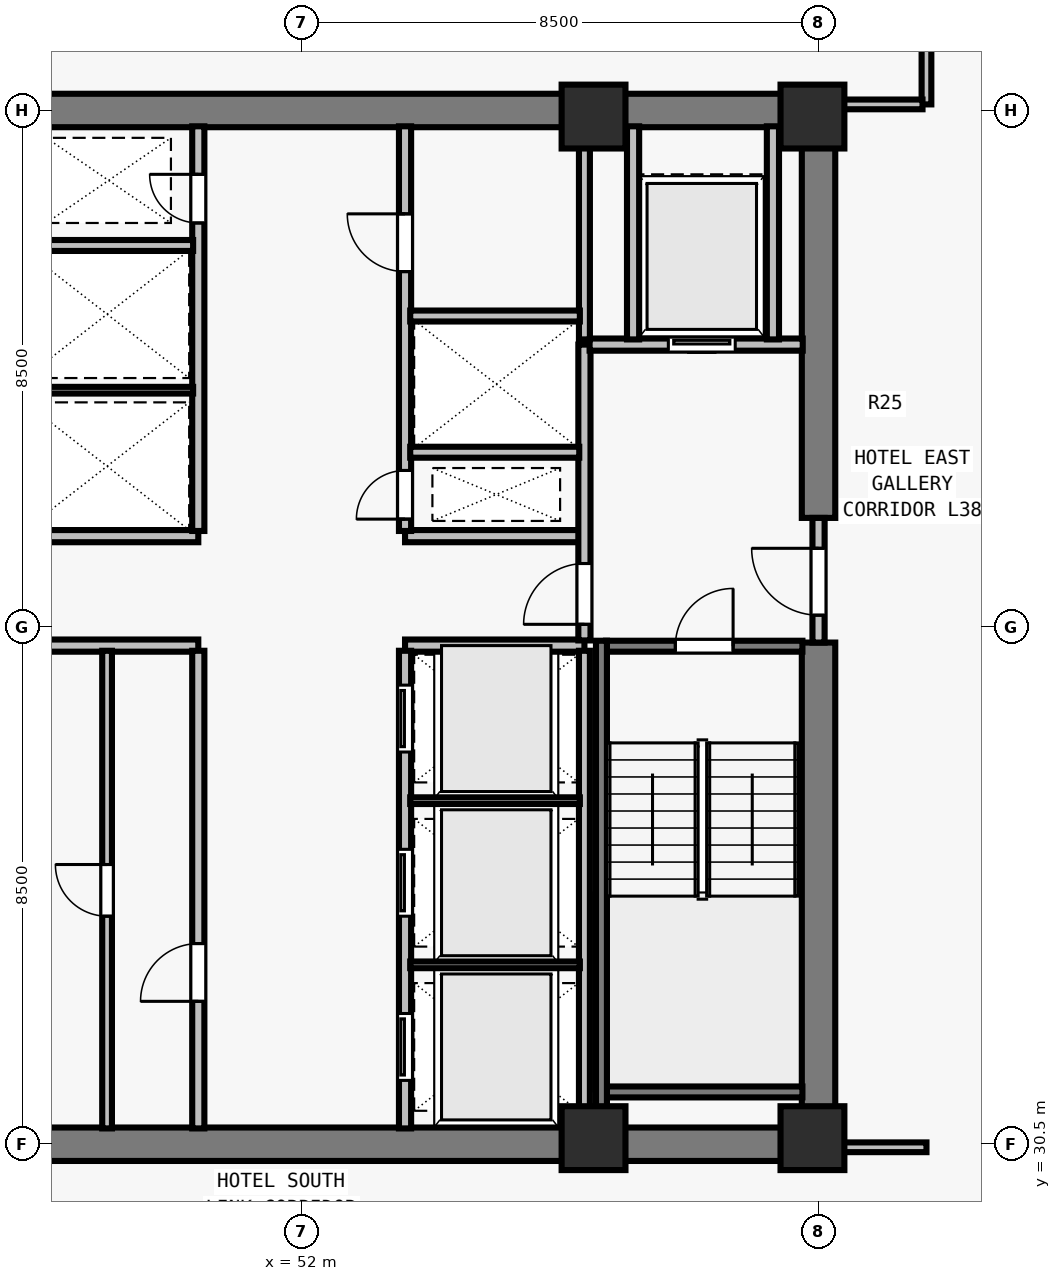
"""IFC4 building model, lengths in metres.
Left out: names, types, materials, properties, quantities, classifications, styles, units other than length and angle.
Written with IfcOpenShell. Run it as: python <this file> out.ifc"""

import sys

from ifc_helpers import new_model, si_unit, direction, frame, frame_2d, origin, origin_2d, place, context, subcontext, project, spatial, rectangle, extrude, element, fill, save


model = new_model("IFC4")
c1 = context("Model", 3, precision=1e-05, world=origin(), true_north=direction((0.0, 1.0)))
c2 = subcontext(c1, "Body", "Model", "MODEL_VIEW")
j1 = project(units=[si_unit("LENGTHUNIT", "METRE"), si_unit("PLANEANGLEUNIT", "RADIAN")], contexts=[c1])
p1 = place(None, origin())
s1 = spatial("IfcSite", under=j1, at=p1, CompositionType="ELEMENT")
p2 = place(p1, origin())
s2 = spatial("IfcBuilding", under=s1, at=p2, CompositionType="ELEMENT")
p3 = place(p2, frame((0.0, 0.0, 141.0)))
s3 = spatial("IfcBuildingStorey", under=s2, at=p3, CompositionType="ELEMENT", Elevation=141.0)
for number, where, z_axis, x_axis in (
    (1, (56.8, 30.6, 0.0), (0.0, 0.0, 1.0), (1.0, 0.0, 0.0)),
    (2, (60.4, 30.6, 0.0), (0.0, 0.0, 1.0), (1.0, 0.0, 0.0)),
    (3, (56.8, 47.4, 0.0), (0.0, 0.0, 1.0), (1.0, 0.0, 0.0)),
    (4, (60.4, 47.4, 0.0), (0.0, 0.0, 1.0), (1.0, 0.0, 0.0)),
):
    element("IfcColumn", number, at=place(p3, frame(where, z_axis=z_axis, x_axis=x_axis)), inside=s3, PredefinedType="COLUMN", context=c2, shape_type="SweptSolid", body=[
        extrude(rectangle(XDim=1.05, YDim=1.05, at=origin_2d()), origin(), (0.0, 0.0, 1.0), 3.5),
    ])
for number, where, z_axis, x_axis in (
    (5, (43.225, 30.5, 0.0), (0.0, 0.0, 1.0), (1.0, 0.0, 0.0)),
    (6, (43.225, 47.5, 0.0), (0.0, 0.0, 1.0), (1.0, 0.0, 0.0)),
):
    element("IfcWall", number, at=place(p3, frame(where, z_axis=z_axis, x_axis=x_axis)), inside=s3, PredefinedType="SHEAR", context=c2, shape_type="SweptSolid", body=[
        extrude(rectangle(XDim=17.55, YDim=0.55, at=frame_2d((8.775, 0.0))), origin(), (0.0, 0.0, 1.0), 3.28),
    ])
p4 = place(p3, frame((60.5, 30.765, 0.0), z_axis=(0.0, 0.0, 1.0), x_axis=(0.0, 1.0, 0.0)))
e7 = element("IfcWall", 7, at=p4, inside=s3, PredefinedType="SHEAR", context=c2, shape_type="SweptSolid", body=[
    extrude(rectangle(XDim=7.985, YDim=0.55, at=frame_2d((3.993, 0.0))), origin(), (0.0, 0.0, 1.0), 3.28),
])
p5 = place(p3, frame((60.5, 40.8, 0.0), z_axis=(0.0, 0.0, 1.0), x_axis=(0.0, 1.0, 0.0)))
e8 = element("IfcWall", 8, at=p5, inside=s3, PredefinedType="SHEAR", context=c2, shape_type="SweptSolid", body=[
    extrude(rectangle(XDim=6.435, YDim=0.55, at=frame_2d((3.218, 0.0))), origin(), (0.0, 0.0, 1.0), 3.28),
])
for number, where, z_axis, x_axis in (
    (9, (47.35, 38.7, 0.0), (0.0, 0.0, 1.0), (1.0, 0.0, 0.0)),
    (10, (47.35, 40.5, 0.0), (0.0, 0.0, 1.0), (1.0, 0.0, 0.0)),
    (11, (53.7, 38.7, 0.0), (0.0, 0.0, 1.0), (1.0, 0.0, 0.0)),
    (12, (53.7, 40.5, 0.0), (0.0, 0.0, 1.0), (1.0, 0.0, 0.0)),
):
    element("IfcWall", number, at=place(p3, frame(where, z_axis=z_axis, x_axis=x_axis)), inside=s3, PredefinedType="SOLIDWALL", context=c2, shape_type="SweptSolid", body=[
        extrude(rectangle(XDim=2.95, YDim=0.2, at=frame_2d((1.475, 0.0))), origin(), (0.0, 0.0, 1.0), 3.28),
    ])
p6 = place(p3, frame((50.3, 30.76, 0.0), z_axis=(0.0, 0.0, 1.0), x_axis=(0.0, 1.0, 0.0)))
e13 = element("IfcWall", 13, at=p6, inside=s3, PredefinedType="SOLIDWALL", context=c2, shape_type="SweptSolid", body=[
    extrude(rectangle(XDim=7.855, YDim=0.2, at=frame_2d((3.927, 0.0))), origin(), (0.0, 0.0, 1.0), 3.28),
])
p7 = place(p6, frame((2.09, 0.0, 0.0)))
e14 = element("IfcOpeningElement", 14, at=p7, cuts=e13, PredefinedType="OPENING", context=c2, shape_type="SweptSolid", body=[
    extrude(rectangle(XDim=0.95, YDim=2.12, at=frame_2d((0.475, 1.06))), frame((0.0, 0.11, 0.0), z_axis=(0.0, -1.0, 0.0), x_axis=(1.0, 0.0, 0.0)), (0.0, 0.0, 1.0), 0.22),
])
p8 = place(p3, frame((53.7, 30.76, 0.0), z_axis=(0.0, 0.0, 1.0), x_axis=(0.0, 1.0, 0.0)))
e15 = element("IfcWall", 15, at=p8, inside=s3, PredefinedType="SOLIDWALL", context=c2, shape_type="SweptSolid", body=[
    extrude(rectangle(XDim=7.855, YDim=0.2, at=frame_2d((3.927, 0.0))), origin(), (0.0, 0.0, 1.0), 3.28),
])
p9 = place(p8, frame((0.79, 0.0, 0.0)))
e16 = element("IfcOpeningElement", 16, at=p9, cuts=e15, PredefinedType="OPENING", context=c2, shape_type="SweptSolid", body=[
    extrude(rectangle(XDim=1.1, YDim=2.2, at=frame_2d((0.55, 1.1))), frame((0.0, 0.11, 0.0), z_axis=(0.0, -1.0, 0.0), x_axis=(1.0, 0.0, 0.0)), (0.0, 0.0, 1.0), 0.22),
])
p10 = place(p8, frame((3.49, 0.0, 0.0)))
e17 = element("IfcOpeningElement", 17, at=p10, cuts=e15, PredefinedType="OPENING", context=c2, shape_type="SweptSolid", body=[
    extrude(rectangle(XDim=1.1, YDim=2.2, at=frame_2d((0.55, 1.1))), frame((0.0, 0.11, 0.0), z_axis=(0.0, -1.0, 0.0), x_axis=(1.0, 0.0, 0.0)), (0.0, 0.0, 1.0), 0.22),
])
p11 = place(p8, frame((6.19, 0.0, 0.0)))
e18 = element("IfcOpeningElement", 18, at=p11, cuts=e15, PredefinedType="OPENING", context=c2, shape_type="SweptSolid", body=[
    extrude(rectangle(XDim=1.1, YDim=2.2, at=frame_2d((0.55, 1.1))), frame((0.0, 0.11, 0.0), z_axis=(0.0, -1.0, 0.0), x_axis=(1.0, 0.0, 0.0)), (0.0, 0.0, 1.0), 0.22),
])
p12 = place(p3, frame((50.3, 40.585, 0.0), z_axis=(0.0, 0.0, 1.0), x_axis=(0.0, 1.0, 0.0)))
e19 = element("IfcWall", 19, at=p12, inside=s3, PredefinedType="SOLIDWALL", context=c2, shape_type="SweptSolid", body=[
    extrude(rectangle(XDim=6.655, YDim=0.2, at=frame_2d((3.328, 0.0))), origin(), (0.0, 0.0, 1.0), 3.28),
])
p13 = place(p12, frame((5.065, 0.0, 0.0)))
e20 = element("IfcOpeningElement", 20, at=p13, cuts=e19, PredefinedType="OPENING", context=c2, shape_type="SweptSolid", body=[
    extrude(rectangle(XDim=0.8, YDim=2.08, at=frame_2d((0.4, 1.04))), frame((0.0, 0.11, 0.0), z_axis=(0.0, -1.0, 0.0), x_axis=(1.0, 0.0, 0.0)), (0.0, 0.0, 1.0), 0.22),
])
p14 = place(p3, frame((53.7, 40.585, 0.0), z_axis=(0.0, 0.0, 1.0), x_axis=(0.0, 1.0, 0.0)))
e21 = element("IfcWall", 21, at=p14, inside=s3, PredefinedType="SOLIDWALL", context=c2, shape_type="SweptSolid", body=[
    extrude(rectangle(XDim=6.655, YDim=0.2, at=frame_2d((3.328, 0.0))), origin(), (0.0, 0.0, 1.0), 3.28),
])
p15 = place(p14, frame((0.195, 0.0, 0.0)))
e22 = element("IfcOpeningElement", 22, at=p15, cuts=e21, PredefinedType="OPENING", context=c2, shape_type="SweptSolid", body=[
    extrude(rectangle(XDim=0.8, YDim=2.08, at=frame_2d((0.4, 1.04))), frame((0.0, 0.11, 0.0), z_axis=(0.0, -1.0, 0.0), x_axis=(1.0, 0.0, 0.0)), (0.0, 0.0, 1.0), 0.22),
])
p16 = place(p14, frame((4.265, 0.0, 0.0)))
e23 = element("IfcOpeningElement", 23, at=p16, cuts=e21, PredefinedType="OPENING", context=c2, shape_type="SweptSolid", body=[
    extrude(rectangle(XDim=0.95, YDim=2.12, at=frame_2d((0.475, 1.06))), frame((0.0, 0.11, 0.0), z_axis=(0.0, -1.0, 0.0), x_axis=(1.0, 0.0, 0.0)), (0.0, 0.0, 1.0), 0.22),
])
p17 = place(p3, frame((60.5, 38.75, 0.0), z_axis=(0.0, 0.0, 1.0), x_axis=(0.0, 1.0, 0.0)))
e24 = element("IfcWall", 24, at=p17, inside=s3, PredefinedType="SOLIDWALL", context=c2, shape_type="SweptSolid", body=[
    extrude(rectangle(XDim=2.05, YDim=0.2, at=frame_2d((1.025, 0.0))), origin(), (0.0, 0.0, 1.0), 3.28),
])
p18 = place(p17, frame((0.45, 0.0, 0.0)))
e25 = element("IfcOpeningElement", 25, at=p18, cuts=e24, PredefinedType="OPENING", context=c2, shape_type="SweptSolid", body=[
    extrude(rectangle(XDim=1.1, YDim=2.15, at=frame_2d((0.55, 1.075))), frame((0.0, 0.11, 0.0), z_axis=(0.0, -1.0, 0.0), x_axis=(1.0, 0.0, 0.0)), (0.0, 0.0, 1.0), 0.22),
])
p19 = place(p3, frame((56.65, 38.785, 0.0), z_axis=(0.0, 0.0, 1.0), x_axis=(0.0, 1.0, 0.0)))
e26 = element("IfcWall", 26, at=p19, inside=s3, PredefinedType="SOLIDWALL", context=c2, shape_type="SweptSolid", body=[
    extrude(rectangle(XDim=4.865, YDim=0.2, at=frame_2d((2.433, 0.0))), origin(), (0.0, 0.0, 1.0), 3.28),
])
p20 = place(p19, frame((0.265, 0.0, 0.0)))
e27 = element("IfcOpeningElement", 27, at=p20, cuts=e26, PredefinedType="OPENING", context=c2, shape_type="SweptSolid", body=[
    extrude(rectangle(XDim=1.0, YDim=2.15, at=frame_2d((0.5, 1.075))), frame((0.0, 0.11, 0.0), z_axis=(0.0, -1.0, 0.0), x_axis=(1.0, 0.0, 0.0)), (0.0, 0.0, 1.0), 0.22),
])
p21 = place(p3, frame((56.735, 43.65, 0.0), z_axis=(0.0, 0.0, 1.0), x_axis=(1.0, 0.0, 0.0)))
e28 = element("IfcWall", 28, at=p21, inside=s3, PredefinedType="SOLIDWALL", context=c2, shape_type="SweptSolid", body=[
    extrude(rectangle(XDim=3.505, YDim=0.2, at=frame_2d((1.752, 0.0))), origin(), (0.0, 0.0, 1.0), 3.28),
])
p22 = place(p21, frame((1.295, 0.0, 0.0)))
e29 = element("IfcOpeningElement", 29, at=p22, cuts=e28, PredefinedType="OPENING", context=c2, shape_type="SweptSolid", body=[
    extrude(rectangle(XDim=1.1, YDim=2.2, at=frame_2d((0.55, 1.1))), frame((0.0, 0.11, 0.0), z_axis=(0.0, -1.0, 0.0), x_axis=(1.0, 0.0, 0.0)), (0.0, 0.0, 1.0), 0.22),
])
for number, where, z_axis, x_axis in (
    (30, (57.45, 43.735, 0.0), (0.0, 0.0, 1.0), (0.0, 1.0, 0.0)),
    (31, (59.75, 43.735, 0.0), (0.0, 0.0, 1.0), (0.0, 1.0, 0.0)),
):
    element("IfcWall", number, at=place(p3, frame(where, z_axis=z_axis, x_axis=x_axis)), inside=s3, PredefinedType="SOLIDWALL", context=c2, shape_type="SweptSolid", body=[
        extrude(rectangle(XDim=3.505, YDim=0.2, at=frame_2d((1.752, 0.0))), origin(), (0.0, 0.0, 1.0), 3.28),
    ])
p23 = place(p3, frame((48.8, 30.76, 0.0), z_axis=(0.0, 0.0, 1.0), x_axis=(0.0, 1.0, 0.0)))
e32 = element("IfcWall", 32, at=p23, inside=s3, PredefinedType="PARTITIONING", context=c2, shape_type="SweptSolid", body=[
    extrude(rectangle(XDim=7.855, YDim=0.16, at=frame_2d((3.927, 0.0))), origin(), (0.0, 0.0, 1.0), 3.28),
])
p24 = place(p23, frame((3.49, 0.0, 0.0)))
e33 = element("IfcOpeningElement", 33, at=p24, cuts=e32, PredefinedType="OPENING", context=c2, shape_type="SweptSolid", body=[
    extrude(rectangle(XDim=0.85, YDim=2.12, at=frame_2d((0.425, 1.06))), frame((0.0, 0.09, 0.0), z_axis=(0.0, -1.0, 0.0), x_axis=(1.0, 0.0, 0.0)), (0.0, 0.0, 1.0), 0.18),
])
p25 = place(p3, frame((56.65, 30.76, 0.0), z_axis=(0.0, 0.0, 1.0), x_axis=(0.0, 1.0, 0.0)))
e34 = element("IfcWall", 34, at=p25, inside=s3, PredefinedType="SOLIDWALL", context=c2, shape_type="SweptSolid", body=[
    extrude(rectangle(XDim=7.855, YDim=0.18, at=frame_2d((3.927, 0.0))), origin(), (0.0, 0.0, 1.0), 3.28),
])
for number, where, z_axis, x_axis in (
    (35, (53.785, 33.45, 0.0), (0.0, 0.0, 1.0), (1.0, 0.0, 0.0)),
    (36, (53.785, 36.15, 0.0), (0.0, 0.0, 1.0), (1.0, 0.0, 0.0)),
):
    element("IfcWall", number, at=place(p3, frame(where, z_axis=z_axis, x_axis=x_axis)), inside=s3, PredefinedType="PARTITIONING", context=c2, shape_type="SweptSolid", body=[
        extrude(rectangle(XDim=2.79, YDim=0.11, at=frame_2d((1.395, 0.0))), origin(), (0.0, 0.0, 1.0), 3.28),
    ])
p26 = place(p3, frame((47.435, 42.9, 0.0), z_axis=(0.0, 0.0, 1.0), x_axis=(1.0, 0.0, 0.0)))
e37 = element("IfcWall", 37, at=p26, inside=s3, PredefinedType="PARTITIONING", context=c2, shape_type="SweptSolid", body=[
    extrude(rectangle(XDim=2.78, YDim=0.11, at=frame_2d((1.39, 0.0))), origin(), (0.0, 0.0, 1.0), 3.28),
])
p27 = place(p3, frame((47.425, 45.28, 0.0), z_axis=(0.0, 0.0, 1.0), x_axis=(1.0, 0.0, 0.0)))
e38 = element("IfcWall", 38, at=p27, inside=s3, PredefinedType="SOLIDWALL", context=c2, shape_type="SweptSolid", body=[
    extrude(rectangle(XDim=2.79, YDim=0.18, at=frame_2d((1.395, 0.0))), origin(), (0.0, 0.0, 1.0), 3.28),
])
p28 = place(p3, frame((56.65, 43.735, 0.0), z_axis=(0.0, 0.0, 1.0), x_axis=(0.0, 1.0, 0.0)))
e39 = element("IfcWall", 39, at=p28, inside=s3, PredefinedType="SOLIDWALL", context=c2, shape_type="SweptSolid", body=[
    extrude(rectangle(XDim=3.505, YDim=0.18, at=frame_2d((1.752, 0.0))), origin(), (0.0, 0.0, 1.0), 3.28),
])
p29 = place(p3, frame((53.785, 41.88, 0.0), z_axis=(0.0, 0.0, 1.0), x_axis=(1.0, 0.0, 0.0)))
e40 = element("IfcWall", 40, at=p29, inside=s3, PredefinedType="SOLIDWALL", context=c2, shape_type="SweptSolid", body=[
    extrude(rectangle(XDim=2.78, YDim=0.18, at=frame_2d((1.39, 0.0))), origin(), (0.0, 0.0, 1.0), 3.28),
])
p30 = place(p3, frame((53.785, 44.12, 0.0), z_axis=(0.0, 0.0, 1.0), x_axis=(1.0, 0.0, 0.0)))
e41 = element("IfcWall", 41, at=p30, inside=s3, PredefinedType="SOLIDWALL", context=c2, shape_type="SweptSolid", body=[
    extrude(rectangle(XDim=2.79, YDim=0.18, at=frame_2d((1.395, 0.0))), origin(), (0.0, 0.0, 1.0), 3.28),
])
p31 = place(p3, frame((62.275, 47.6, 0.0), z_axis=(0.0, 0.0, 1.0), x_axis=(0.0, 1.0, 0.0)))
e42 = element("IfcWall", 42, at=p31, inside=s3, PredefinedType="PARTITIONING", context=c2, shape_type="SweptSolid", body=[
    extrude(rectangle(XDim=15.075, YDim=0.16, at=frame_2d((7.538, 0.0))), origin(), (0.0, 0.0, 1.0), 2.555),
])
p32 = place(p3, frame((60.765, 30.45, 0.0), z_axis=(0.0, 0.0, 1.0), x_axis=(1.0, 0.0, 0.0)))
e43 = element("IfcWall", 43, at=p32, inside=s3, PredefinedType="PARTITIONING", context=c2, shape_type="SweptSolid", body=[
    extrude(rectangle(XDim=1.51, YDim=0.16, at=frame_2d((0.755, 0.0))), origin(), (0.0, 0.0, 1.0), 3.28),
])
p33 = place(p3, frame((60.765, 47.6, 0.0), z_axis=(0.0, 0.0, 1.0), x_axis=(1.0, 0.0, 0.0)))
e44 = element("IfcWall", 44, at=p33, inside=s3, PredefinedType="PARTITIONING", context=c2, shape_type="SweptSolid", body=[
    extrude(rectangle(XDim=1.445, YDim=0.16, at=frame_2d((0.723, 0.0))), origin(), (0.0, 0.0, 1.0), 3.28),
])
p34 = place(p3, frame((57.005, 38.69, 0.0), z_axis=(0.0, 0.0, 1.0), x_axis=(1.0, 0.0, 0.0)))
e45 = element("IfcWall", 45, at=p34, inside=s3, PredefinedType="SOLIDWALL", context=c2, shape_type="SweptSolid", body=[
    extrude(rectangle(XDim=3.23, YDim=0.18, at=frame_2d((1.615, 0.0))), origin(), (0.0, 0.0, 1.0), 3.28),
])
p35 = place(p34, frame((1.14, 0.0, 0.0)))
e46 = element("IfcOpeningElement", 46, at=p35, cuts=e45, PredefinedType="OPENING", context=c2, shape_type="SweptSolid", body=[
    extrude(rectangle(XDim=0.95, YDim=2.15, at=frame_2d((0.475, 1.075))), frame((0.0, 0.1, 0.0), z_axis=(0.0, -1.0, 0.0), x_axis=(1.0, 0.0, 0.0)), (0.0, 0.0, 1.0), 0.2),
])
p36 = place(p3, frame((57.005, 31.36, 0.0), z_axis=(0.0, 0.0, 1.0), x_axis=(1.0, 0.0, 0.0)))
e47 = element("IfcWall", 47, at=p36, inside=s3, PredefinedType="SOLIDWALL", context=c2, shape_type="SweptSolid", body=[
    extrude(rectangle(XDim=3.23, YDim=0.18, at=frame_2d((1.615, 0.0))), origin(), (0.0, 0.0, 1.0), 3.28),
])
p37 = place(p3, frame((56.93, 38.78, 0.0), z_axis=(0.0, 0.0, 1.0), x_axis=(0.0, -1.0, 0.0)))
e48 = element("IfcWall", 48, at=p37, inside=s3, PredefinedType="SOLIDWALL", context=c2, shape_type="SweptSolid", body=[
    extrude(rectangle(XDim=8.017, YDim=0.18, at=frame_2d((4.009, 0.0))), origin(), (0.0, 0.0, 1.0), 3.28),
])
p38 = place(p18, origin())
e49 = element("IfcDoor", 49, at=p38, inside=s3, OperationType="SINGLE_SWING_RIGHT", PredefinedType="DOOR", context=c2, shape_type="SweptSolid", body=[
    extrude(rectangle(XDim=1.1, YDim=2.15, at=frame_2d((0.55, 1.075))), frame((0.0, 0.025, 0.0), z_axis=(0.0, -1.0, 0.0), x_axis=(1.0, 0.0, 0.0)), (0.0, 0.0, 1.0), 0.05),
])
fill(e25, e49)
p39 = place(p20, origin())
e50 = element("IfcDoor", 50, at=p39, inside=s3, OperationType="SINGLE_SWING_LEFT", PredefinedType="DOOR", context=c2, shape_type="SweptSolid", body=[
    extrude(rectangle(XDim=1.0, YDim=2.15, at=frame_2d((0.5, 1.075))), frame((0.0, 0.025, 0.0), z_axis=(0.0, -1.0, 0.0), x_axis=(1.0, 0.0, 0.0)), (0.0, 0.0, 1.0), 0.05),
])
fill(e27, e50)
p40 = place(p22, origin())
e51 = element("IfcDoor", 51, at=p40, inside=s3, OperationType="SLIDING_TO_LEFT", PredefinedType="DOOR", context=c2, shape_type="SweptSolid", body=[
    extrude(rectangle(XDim=1.1, YDim=2.2, at=frame_2d((0.55, 1.1))), frame((0.0, 0.025, 0.0), z_axis=(0.0, -1.0, 0.0), x_axis=(1.0, 0.0, 0.0)), (0.0, 0.0, 1.0), 0.05),
])
fill(e29, e51)
p41 = place(p7, origin())
e52 = element("IfcDoor", 52, at=p41, inside=s3, OperationType="SINGLE_SWING_LEFT", PredefinedType="DOOR", context=c2, shape_type="SweptSolid", body=[
    extrude(rectangle(XDim=0.95, YDim=2.12, at=frame_2d((0.475, 1.06))), frame((0.0, 0.025, 0.0), z_axis=(0.0, -1.0, 0.0), x_axis=(1.0, 0.0, 0.0)), (0.0, 0.0, 1.0), 0.05),
])
fill(e14, e52)
p42 = place(p24, origin())
e53 = element("IfcDoor", 53, at=p42, inside=s3, OperationType="SINGLE_SWING_RIGHT", PredefinedType="DOOR", context=c2, shape_type="SweptSolid", body=[
    extrude(rectangle(XDim=0.85, YDim=2.12, at=frame_2d((0.425, 1.06))), frame((0.0, 0.025, 0.0), z_axis=(0.0, -1.0, 0.0), x_axis=(1.0, 0.0, 0.0)), (0.0, 0.0, 1.0), 0.05),
])
fill(e33, e53)
p43 = place(p9, origin())
e54 = element("IfcDoor", 54, at=p43, inside=s3, OperationType="SLIDING_TO_LEFT", PredefinedType="DOOR", context=c2, shape_type="SweptSolid", body=[
    extrude(rectangle(XDim=1.1, YDim=2.2, at=frame_2d((0.55, 1.1))), frame((0.0, 0.025, 0.0), z_axis=(0.0, -1.0, 0.0), x_axis=(1.0, 0.0, 0.0)), (0.0, 0.0, 1.0), 0.05),
])
fill(e16, e54)
p44 = place(p10, origin())
e55 = element("IfcDoor", 55, at=p44, inside=s3, OperationType="SLIDING_TO_LEFT", PredefinedType="DOOR", context=c2, shape_type="SweptSolid", body=[
    extrude(rectangle(XDim=1.1, YDim=2.2, at=frame_2d((0.55, 1.1))), frame((0.0, 0.025, 0.0), z_axis=(0.0, -1.0, 0.0), x_axis=(1.0, 0.0, 0.0)), (0.0, 0.0, 1.0), 0.05),
])
fill(e17, e55)
p45 = place(p11, origin())
e56 = element("IfcDoor", 56, at=p45, inside=s3, OperationType="SLIDING_TO_LEFT", PredefinedType="DOOR", context=c2, shape_type="SweptSolid", body=[
    extrude(rectangle(XDim=1.1, YDim=2.2, at=frame_2d((0.55, 1.1))), frame((0.0, 0.025, 0.0), z_axis=(0.0, -1.0, 0.0), x_axis=(1.0, 0.0, 0.0)), (0.0, 0.0, 1.0), 0.05),
])
fill(e18, e56)
p46 = place(p13, origin())
e57 = element("IfcDoor", 57, at=p46, inside=s3, OperationType="SINGLE_SWING_RIGHT", PredefinedType="DOOR", context=c2, shape_type="SweptSolid", body=[
    extrude(rectangle(XDim=0.8, YDim=2.08, at=frame_2d((0.4, 1.04))), frame((0.0, 0.025, 0.0), z_axis=(0.0, -1.0, 0.0), x_axis=(1.0, 0.0, 0.0)), (0.0, 0.0, 1.0), 0.05),
])
fill(e20, e57)
p47 = place(p15, origin())
e58 = element("IfcDoor", 58, at=p47, inside=s3, OperationType="SINGLE_SWING_LEFT", PredefinedType="DOOR", context=c2, shape_type="SweptSolid", body=[
    extrude(rectangle(XDim=0.8, YDim=2.08, at=frame_2d((0.4, 1.04))), frame((0.0, 0.025, 0.0), z_axis=(0.0, -1.0, 0.0), x_axis=(1.0, 0.0, 0.0)), (0.0, 0.0, 1.0), 0.05),
])
fill(e22, e58)
p48 = place(p16, origin())
e59 = element("IfcDoor", 59, at=p48, inside=s3, OperationType="SINGLE_SWING_RIGHT", PredefinedType="DOOR", context=c2, shape_type="SweptSolid", body=[
    extrude(rectangle(XDim=0.95, YDim=2.12, at=frame_2d((0.475, 1.06))), frame((0.0, 0.025, 0.0), z_axis=(0.0, -1.0, 0.0), x_axis=(1.0, 0.0, 0.0)), (0.0, 0.0, 1.0), 0.05),
])
fill(e23, e59)
p49 = place(p35, origin())
e60 = element("IfcDoor", 60, at=p49, inside=s3, OperationType="SINGLE_SWING_RIGHT", PredefinedType="DOOR", context=c2, shape_type="SweptSolid", body=[
    extrude(rectangle(XDim=0.95, YDim=2.15, at=frame_2d((0.475, 1.075))), frame((0.0, 0.025, 0.0), z_axis=(0.0, -1.0, 0.0), x_axis=(1.0, 0.0, 0.0)), (0.0, 0.0, 1.0), 0.05),
])
fill(e46, e60)
save(model, sys.argv[1])
